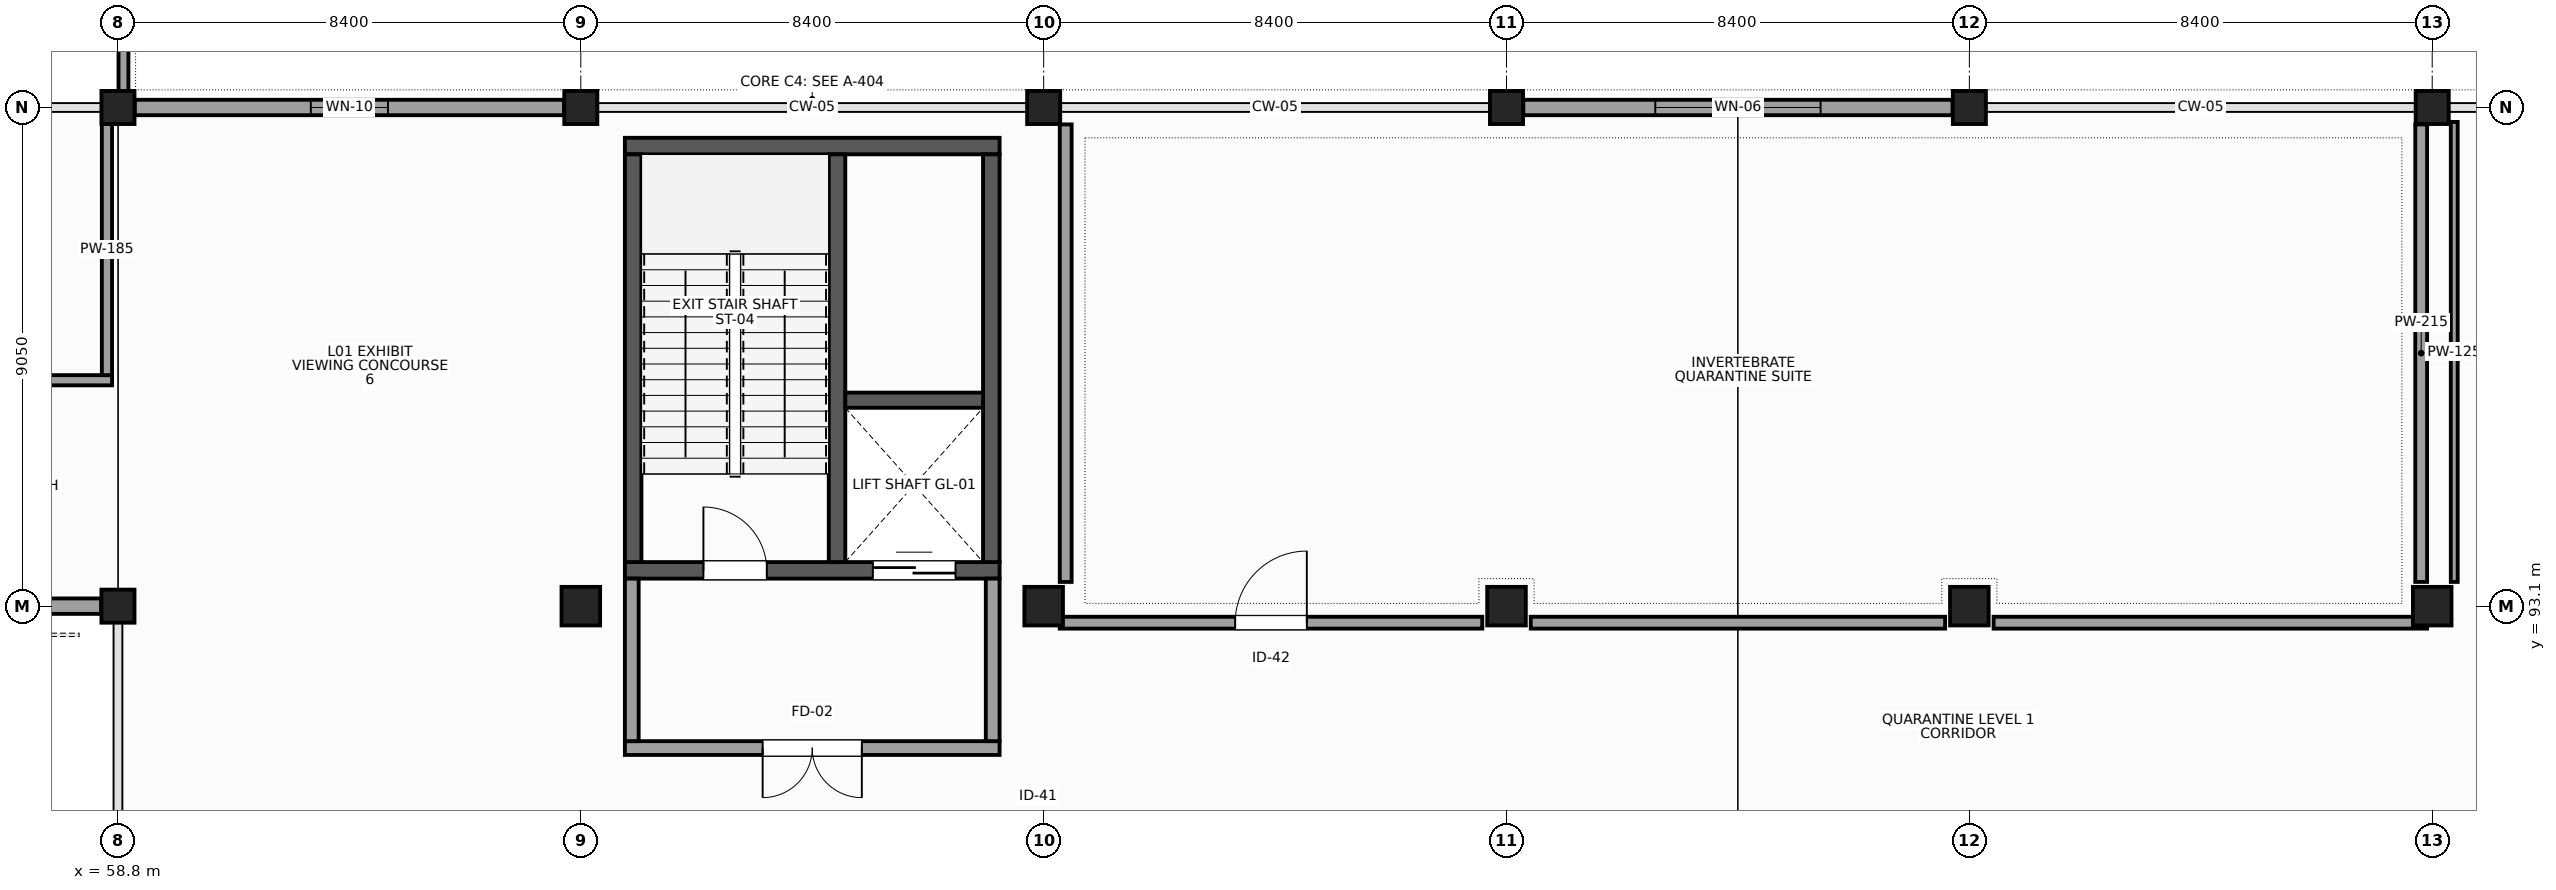
"""IFC4 building model, lengths in metres.
Left out: names, types, materials, properties, quantities, classifications, styles, units other than length and angle.
Written with IfcOpenShell. Run it as: python <this file> out.ifc"""

import sys

from ifc_helpers import new_model, si_unit, direction, frame, frame_2d, origin, origin_2d, place, context, subcontext, project, spatial, rectangle, extrude, element, fill, save


model = new_model("IFC4")
c1 = context("Model", 3, precision=1e-05, world=origin(), true_north=direction((0.0, 1.0)))
c2 = subcontext(c1, "Body", "Model", "MODEL_VIEW")
j1 = project(units=[si_unit("LENGTHUNIT", "METRE"), si_unit("PLANEANGLEUNIT", "RADIAN")], contexts=[c1])
p1 = place(None, origin())
s1 = spatial("IfcSite", under=j1, at=p1, CompositionType="ELEMENT")
p2 = place(p1, origin())
s2 = spatial("IfcBuilding", under=s1, at=p2, CompositionType="ELEMENT")
p3 = place(p2, frame((0.0, 0.0, 5.4)))
s3 = spatial("IfcBuildingStorey", under=s2, at=p3, CompositionType="ELEMENT", Elevation=5.4)
for number, where, z_axis, x_axis in (
    (1, (58.8, 93.1, 0.0), (0.0, 0.0, 1.0), (1.0, 0.0, 0.0)),
    (2, (58.8, 102.15, 0.0), (0.0, 0.0, 1.0), (1.0, 0.0, 0.0)),
):
    element("IfcColumn", number, at=place(p3, frame(where, z_axis=z_axis, x_axis=x_axis)), inside=s3, PredefinedType="COLUMN", context=c2, shape_type="SweptSolid", body=[
        extrude(rectangle(XDim=0.6, YDim=0.6, at=origin_2d()), origin(), (0.0, 0.0, 1.0), 5.4),
    ])
p4 = place(p3, frame((67.2, 93.1, 0.0), z_axis=(0.0, 0.0, 1.0), x_axis=(1.0, 0.0, 0.0)))
e3 = element("IfcColumn", 3, at=p4, inside=s3, PredefinedType="COLUMN", context=c2, shape_type="SweptSolid", body=[
    extrude(rectangle(XDim=0.7, YDim=0.7, at=origin_2d()), origin(), (0.0, 0.0, 1.0), 5.4),
])
p5 = place(p3, frame((67.2, 102.15, 0.0), z_axis=(0.0, 0.0, 1.0), x_axis=(1.0, 0.0, 0.0)))
e4 = element("IfcColumn", 4, at=p5, inside=s3, PredefinedType="COLUMN", context=c2, shape_type="SweptSolid", body=[
    extrude(rectangle(XDim=0.6, YDim=0.6, at=origin_2d()), origin(), (0.0, 0.0, 1.0), 5.4),
])
p6 = place(p3, frame((75.6, 93.1, 0.0), z_axis=(0.0, 0.0, 1.0), x_axis=(1.0, 0.0, 0.0)))
e5 = element("IfcColumn", 5, at=p6, inside=s3, PredefinedType="COLUMN", context=c2, shape_type="SweptSolid", body=[
    extrude(rectangle(XDim=0.7, YDim=0.7, at=origin_2d()), origin(), (0.0, 0.0, 1.0), 5.4),
])
p7 = place(p3, frame((75.6, 102.15, 0.0), z_axis=(0.0, 0.0, 1.0), x_axis=(1.0, 0.0, 0.0)))
e6 = element("IfcColumn", 6, at=p7, inside=s3, PredefinedType="COLUMN", context=c2, shape_type="SweptSolid", body=[
    extrude(rectangle(XDim=0.6, YDim=0.6, at=origin_2d()), origin(), (0.0, 0.0, 1.0), 5.4),
])
p8 = place(p3, frame((84.0, 93.1, 0.0), z_axis=(0.0, 0.0, 1.0), x_axis=(1.0, 0.0, 0.0)))
e7 = element("IfcColumn", 7, at=p8, inside=s3, PredefinedType="COLUMN", context=c2, shape_type="SweptSolid", body=[
    extrude(rectangle(XDim=0.7, YDim=0.7, at=origin_2d()), origin(), (0.0, 0.0, 1.0), 5.4),
])
p9 = place(p3, frame((84.0, 102.15, 0.0), z_axis=(0.0, 0.0, 1.0), x_axis=(1.0, 0.0, 0.0)))
e8 = element("IfcColumn", 8, at=p9, inside=s3, PredefinedType="COLUMN", context=c2, shape_type="SweptSolid", body=[
    extrude(rectangle(XDim=0.6, YDim=0.6, at=origin_2d()), origin(), (0.0, 0.0, 1.0), 5.4),
])
p10 = place(p3, frame((92.4, 93.1, 0.0), z_axis=(0.0, 0.0, 1.0), x_axis=(1.0, 0.0, 0.0)))
e9 = element("IfcColumn", 9, at=p10, inside=s3, PredefinedType="COLUMN", context=c2, shape_type="SweptSolid", body=[
    extrude(rectangle(XDim=0.7, YDim=0.7, at=origin_2d()), origin(), (0.0, 0.0, 1.0), 5.4),
])
p11 = place(p3, frame((92.4, 102.15, 0.0), z_axis=(0.0, 0.0, 1.0), x_axis=(1.0, 0.0, 0.0)))
e10 = element("IfcColumn", 10, at=p11, inside=s3, PredefinedType="COLUMN", context=c2, shape_type="SweptSolid", body=[
    extrude(rectangle(XDim=0.6, YDim=0.6, at=origin_2d()), origin(), (0.0, 0.0, 1.0), 5.4),
])
p12 = place(p3, frame((100.8, 93.1, 0.0), z_axis=(0.0, 0.0, 1.0), x_axis=(1.0, 0.0, 0.0)))
e11 = element("IfcColumn", 11, at=p12, inside=s3, PredefinedType="COLUMN", context=c2, shape_type="SweptSolid", body=[
    extrude(rectangle(XDim=0.7, YDim=0.7, at=origin_2d()), origin(), (0.0, 0.0, 1.0), 5.4),
])
p13 = place(p3, frame((100.8, 102.15, 0.0), z_axis=(0.0, 0.0, 1.0), x_axis=(1.0, 0.0, 0.0)))
e12 = element("IfcColumn", 12, at=p13, inside=s3, PredefinedType="COLUMN", context=c2, shape_type="SweptSolid", body=[
    extrude(rectangle(XDim=0.6, YDim=0.6, at=origin_2d()), origin(), (0.0, 0.0, 1.0), 5.4),
])
p14 = place(p3, frame((92.095, 102.15, 0.0), z_axis=(0.0, 0.0, 1.0), x_axis=(-1.0, 0.0, 0.0)))
e13 = element("IfcWall", 13, at=p14, inside=s3, PredefinedType="STANDARD", context=c2, shape_type="SweptSolid", body=[
    extrude(rectangle(XDim=7.79, YDim=0.28, at=frame_2d((3.895, 0.0))), origin(), (0.0, 0.0, 1.0), 4.23),
])
p15 = place(p14, frame((2.395, 0.0, 0.95)))
e14 = element("IfcOpeningElement", 14, at=p15, cuts=e13, PredefinedType="OPENING", context=c2, shape_type="SweptSolid", body=[
    extrude(rectangle(XDim=3.0, YDim=1.8, at=frame_2d((1.5, 0.9))), frame((0.0, 0.15, 0.0), z_axis=(0.0, -1.0, 0.0), x_axis=(1.0, 0.0, 0.0)), (0.0, 0.0, 1.0), 0.3),
])
p16 = place(p3, frame((66.895, 102.15, 0.0), z_axis=(0.0, 0.0, 1.0), x_axis=(-1.0, 0.0, 0.0)))
e15 = element("IfcWall", 15, at=p16, inside=s3, PredefinedType="STANDARD", context=c2, shape_type="SweptSolid", body=[
    extrude(rectangle(XDim=7.79, YDim=0.28, at=frame_2d((3.895, 0.0))), origin(), (0.0, 0.0, 1.0), 4.23),
])
p17 = place(p16, frame((3.195, 0.0, 0.95)))
e16 = element("IfcOpeningElement", 16, at=p17, cuts=e15, PredefinedType="OPENING", context=c2, shape_type="SweptSolid", body=[
    extrude(rectangle(XDim=1.4, YDim=1.6, at=frame_2d((0.7, 0.8))), frame((0.0, 0.15, 0.0), z_axis=(0.0, -1.0, 0.0), x_axis=(1.0, 0.0, 0.0)), (0.0, 0.0, 1.0), 0.3),
])
p18 = place(p3, frame((50.705, 93.1, 0.0), z_axis=(0.0, 0.0, 1.0), x_axis=(1.0, 0.0, 0.0)))
e17 = element("IfcWall", 17, at=p18, inside=s3, PredefinedType="STANDARD", context=c2, shape_type="SweptSolid", body=[
    extrude(rectangle(XDim=7.79, YDim=0.28, at=frame_2d((3.895, 0.0))), origin(), (0.0, 0.0, 1.0), 4.23),
])
p19 = place(p18, frame((2.495, 0.0, 0.95)))
e18 = element("IfcOpeningElement", 18, at=p19, cuts=e17, PredefinedType="OPENING", context=c2, shape_type="SweptSolid", body=[
    extrude(rectangle(XDim=2.8, YDim=2.2, at=frame_2d((1.4, 1.1))), frame((0.0, 0.15, 0.0), z_axis=(0.0, -1.0, 0.0), x_axis=(1.0, 0.0, 0.0)), (0.0, 0.0, 1.0), 0.3),
])
p20 = place(p3, frame((58.9, 102.35, 0.0), z_axis=(0.0, 0.0, 1.0), x_axis=(0.0, 1.0, 0.0)))
e19 = element("IfcWall", 19, at=p20, inside=s3, PredefinedType="PARAPET", context=c2, shape_type="SweptSolid", body=[
    extrude(rectangle(XDim=8.65, YDim=0.18, at=frame_2d((4.325, 0.0))), origin(), (0.0, 0.0, 1.0), 1.12),
])
p21 = place(p3, frame((68.0, 93.75, 0.0), z_axis=(0.0, 0.0, 1.0), x_axis=(1.0, 0.0, 0.0)))
e20 = element("IfcWall", 20, at=p21, inside=s3, PredefinedType="SHEAR", context=c2, shape_type="SweptSolid", body=[
    extrude(rectangle(XDim=6.8, YDim=0.3, at=frame_2d((3.4, 0.0))), origin(), (0.0, 0.0, 1.0), 5.1),
])
p22 = place(p21, frame((1.425, 0.0, 0.0)))
e21 = element("IfcOpeningElement", 21, at=p22, cuts=e20, PredefinedType="OPENING", context=c2, shape_type="SweptSolid", body=[
    extrude(rectangle(XDim=1.15, YDim=2.2, at=frame_2d((0.575, 1.1))), frame((0.0, 0.16, 0.0), z_axis=(0.0, -1.0, 0.0), x_axis=(1.0, 0.0, 0.0)), (0.0, 0.0, 1.0), 0.32),
])
p23 = place(p21, frame((4.5, 0.0, 0.0)))
e22 = element("IfcOpeningElement", 22, at=p23, cuts=e20, PredefinedType="OPENING", context=c2, shape_type="SweptSolid", body=[
    extrude(rectangle(XDim=1.5, YDim=2.3, at=frame_2d((0.75, 1.15))), frame((0.0, 0.16, 0.0), z_axis=(0.0, -1.0, 0.0), x_axis=(1.0, 0.0, 0.0)), (0.0, 0.0, 1.0), 0.32),
])
p24 = place(p3, frame((68.0, 101.45, 0.0), z_axis=(0.0, 0.0, 1.0), x_axis=(1.0, 0.0, 0.0)))
e23 = element("IfcWall", 23, at=p24, inside=s3, PredefinedType="SHEAR", context=c2, shape_type="SweptSolid", body=[
    extrude(rectangle(XDim=6.8, YDim=0.3, at=frame_2d((3.4, 0.0))), origin(), (0.0, 0.0, 1.0), 5.1),
])
for number, where, z_axis, x_axis in (
    (24, (68.15, 93.9, 0.0), (0.0, 0.0, 1.0), (0.0, 1.0, 0.0)),
    (25, (74.65, 93.9, 0.0), (0.0, 0.0, 1.0), (0.0, 1.0, 0.0)),
    (26, (71.85, 93.9, 0.0), (0.0, 0.0, 1.0), (0.0, 1.0, 0.0)),
):
    element("IfcWall", number, at=place(p3, frame(where, z_axis=z_axis, x_axis=x_axis)), inside=s3, PredefinedType="SHEAR", context=c2, shape_type="SweptSolid", body=[
        extrude(rectangle(XDim=7.4, YDim=0.3, at=frame_2d((3.7, 0.0))), origin(), (0.0, 0.0, 1.0), 5.1),
    ])
p25 = place(p3, frame((72.0, 96.838, 0.0), z_axis=(0.0, 0.0, 1.0), x_axis=(1.0, 0.0, 0.0)))
e27 = element("IfcWall", 27, at=p25, inside=s3, PredefinedType="SHEAR", context=c2, shape_type="SweptSolid", body=[
    extrude(rectangle(XDim=2.5, YDim=0.275, at=frame_2d((1.25, 0.0))), origin(), (0.0, 0.0, 1.0), 5.1),
])
p26 = place(p3, frame((68.0, 90.525, 0.0), z_axis=(0.0, 0.0, 1.0), x_axis=(1.0, 0.0, 0.0)))
e28 = element("IfcWall", 28, at=p26, inside=s3, PredefinedType="PARTITIONING", context=c2, shape_type="SweptSolid", body=[
    extrude(rectangle(XDim=6.8, YDim=0.25, at=frame_2d((3.4, 0.0))), origin(), (0.0, 0.0, 1.0), 5.1),
])
p27 = place(p26, frame((2.5, 0.0, 0.0)))
e29 = element("IfcOpeningElement", 29, at=p27, cuts=e28, PredefinedType="OPENING", context=c2, shape_type="SweptSolid", body=[
    extrude(rectangle(XDim=1.8, YDim=2.25, at=frame_2d((0.9, 1.125))), frame((0.0, 0.135, 0.0), z_axis=(0.0, -1.0, 0.0), x_axis=(1.0, 0.0, 0.0)), (0.0, 0.0, 1.0), 0.27),
])
for number, where, z_axis, x_axis in (
    (30, (68.125, 90.65, 0.0), (0.0, 0.0, 1.0), (0.0, 1.0, 0.0)),
    (31, (74.675, 90.65, 0.0), (0.0, 0.0, 1.0), (0.0, 1.0, 0.0)),
):
    element("IfcWall", number, at=place(p3, frame(where, z_axis=z_axis, x_axis=x_axis)), inside=s3, PredefinedType="PARTITIONING", context=c2, shape_type="SweptSolid", body=[
        extrude(rectangle(XDim=2.95, YDim=0.25, at=frame_2d((1.475, 0.0))), origin(), (0.0, 0.0, 1.0), 4.33),
    ])
p28 = place(p3, frame((33.707, 97.2, 0.0), z_axis=(0.0, 0.0, 1.0), x_axis=(1.0, 0.0, 0.0)))
e32 = element("IfcWall", 32, at=p28, inside=s3, PredefinedType="PARTITIONING", context=c2, shape_type="SweptSolid", body=[
    extrude(rectangle(XDim=24.986, YDim=0.185, at=frame_2d((12.493, 0.0))), origin(), (0.0, 0.0, 1.0), 4.25),
])
p29 = place(p28, frame((11.923, 0.0, 0.0)))
e33 = element("IfcOpeningElement", 33, at=p29, cuts=e32, PredefinedType="OPENING", context=c2, shape_type="SweptSolid", body=[
    extrude(rectangle(XDim=1.14, YDim=2.28, at=frame_2d((0.57, 1.14))), frame((0.0, 0.103, 0.0), z_axis=(0.0, -1.0, 0.0), x_axis=(1.0, 0.0, 0.0)), (0.0, 0.0, 1.0), 0.205),
])
p30 = place(p28, frame((13.663, 0.0, 1.05)))
e34 = element("IfcOpeningElement", 34, at=p30, cuts=e32, PredefinedType="OPENING", context=c2, shape_type="SweptSolid", body=[
    extrude(rectangle(XDim=1.55, YDim=1.32, at=frame_2d((0.775, 0.66))), frame((0.0, 0.103, 0.0), z_axis=(0.0, -1.0, 0.0), x_axis=(1.0, 0.0, 0.0)), (0.0, 0.0, 1.0), 0.205),
])
p31 = place(p3, frame((58.6, 97.293, 0.0), z_axis=(0.0, 0.0, 1.0), x_axis=(0.0, 1.0, 0.0)))
e35 = element("IfcWall", 35, at=p31, inside=s3, PredefinedType="PARTITIONING", context=c2, shape_type="SweptSolid", body=[
    extrude(rectangle(XDim=4.565, YDim=0.185, at=frame_2d((2.282, 0.0))), origin(), (0.0, 0.0, 1.0), 4.23),
])
p32 = place(p3, frame((75.892, 92.8, 0.0), z_axis=(0.0, 0.0, 1.0), x_axis=(1.0, 0.0, 0.0)))
e36 = element("IfcWall", 36, at=p32, inside=s3, PredefinedType="PARTITIONING", context=c2, shape_type="SweptSolid", body=[
    extrude(rectangle(XDim=7.668, YDim=0.215, at=frame_2d((3.834, 0.0))), origin(), (0.0, 0.0, 1.0), 4.33),
])
p33 = place(p32, frame((3.184, 0.0, 0.0)))
e37 = element("IfcOpeningElement", 37, at=p33, cuts=e36, PredefinedType="OPENING", context=c2, shape_type="SweptSolid", body=[
    extrude(rectangle(XDim=1.3, YDim=2.38, at=frame_2d((0.65, 1.19))), frame((0.0, 0.118, 0.0), z_axis=(0.0, -1.0, 0.0), x_axis=(1.0, 0.0, 0.0)), (0.0, 0.0, 1.0), 0.235),
])
p34 = place(p3, frame((84.44, 92.8, 0.0), z_axis=(0.0, 0.0, 1.0), x_axis=(1.0, 0.0, 0.0)))
e38 = element("IfcWall", 38, at=p34, inside=s3, PredefinedType="PARTITIONING", context=c2, shape_type="SweptSolid", body=[
    extrude(rectangle(XDim=7.52, YDim=0.215, at=frame_2d((3.76, 0.0))), origin(), (0.0, 0.0, 1.0), 4.33),
])
p35 = place(p3, frame((92.84, 92.8, 0.0), z_axis=(0.0, 0.0, 1.0), x_axis=(1.0, 0.0, 0.0)))
e39 = element("IfcWall", 39, at=p35, inside=s3, PredefinedType="PARTITIONING", context=c2, shape_type="SweptSolid", body=[
    extrude(rectangle(XDim=7.867, YDim=0.215, at=frame_2d((3.934, 0.0))), origin(), (0.0, 0.0, 1.0), 4.33),
])
for number, where, z_axis, x_axis in (
    (40, (100.6, 93.54, 0.0), (0.0, 0.0, 1.0), (0.0, 1.0, 0.0)),
    (41, (76.0, 93.54, 0.0), (0.0, 0.0, 1.0), (0.0, 1.0, 0.0)),
):
    element("IfcWall", number, at=place(p3, frame(where, z_axis=z_axis, x_axis=x_axis)), inside=s3, PredefinedType="PARTITIONING", context=c2, shape_type="SweptSolid", body=[
        extrude(rectangle(XDim=8.303, YDim=0.215, at=frame_2d((4.151, 0.0))), origin(), (0.0, 0.0, 1.0), 4.23),
    ])
p36 = place(p3, frame((101.2, 93.54, 0.0), z_axis=(0.0, 0.0, 1.0), x_axis=(0.0, 1.0, 0.0)))
e42 = element("IfcWall", 42, at=p36, inside=s3, PredefinedType="PARTITIONING", context=c2, shape_type="SweptSolid", body=[
    extrude(rectangle(XDim=8.348, YDim=0.125, at=frame_2d((4.174, 0.0))), origin(), (0.0, 0.0, 1.0), 4.23),
])
p37 = place(p15, origin())
e43 = element("IfcWindow", 43, at=p37, inside=s3, PartitioningType="SINGLE_PANEL", PredefinedType="WINDOW", context=c2, shape_type="SweptSolid", body=[
    extrude(rectangle(XDim=3.0, YDim=1.8, at=frame_2d((1.5, 0.9))), frame((0.0, 0.03, 0.0), z_axis=(0.0, -1.0, 0.0), x_axis=(1.0, 0.0, 0.0)), (0.0, 0.0, 1.0), 0.06),
])
fill(e14, e43)
p38 = place(p17, origin())
e44 = element("IfcWindow", 44, at=p38, inside=s3, PartitioningType="SINGLE_PANEL", PredefinedType="WINDOW", context=c2, shape_type="SweptSolid", body=[
    extrude(rectangle(XDim=1.4, YDim=1.6, at=frame_2d((0.7, 0.8))), frame((0.0, 0.03, 0.0), z_axis=(0.0, -1.0, 0.0), x_axis=(1.0, 0.0, 0.0)), (0.0, 0.0, 1.0), 0.06),
])
fill(e16, e44)
p39 = place(p22, origin())
e45 = element("IfcDoor", 45, at=p39, inside=s3, OperationType="SINGLE_SWING_LEFT", PredefinedType="DOOR", context=c2, shape_type="SweptSolid", body=[
    extrude(rectangle(XDim=1.15, YDim=2.2, at=frame_2d((0.575, 1.1))), frame((0.0, 0.025, 0.0), z_axis=(0.0, -1.0, 0.0), x_axis=(1.0, 0.0, 0.0)), (0.0, 0.0, 1.0), 0.05),
])
fill(e21, e45)
p40 = place(p23, origin())
e46 = element("IfcDoor", 46, at=p40, inside=s3, OperationType="DOUBLE_DOOR_SLIDING", PredefinedType="DOOR", context=c2, shape_type="SweptSolid", body=[
    extrude(rectangle(XDim=1.5, YDim=2.3, at=frame_2d((0.75, 1.15))), frame((0.0, 0.025, 0.0), z_axis=(0.0, -1.0, 0.0), x_axis=(1.0, 0.0, 0.0)), (0.0, 0.0, 1.0), 0.05),
])
fill(e22, e46)
p41 = place(p27, frame((1.8, 0.0, 0.0), z_axis=(0.0, 0.0, 1.0), x_axis=(-1.0, 0.0, 0.0)))
e47 = element("IfcDoor", 47, at=p41, inside=s3, OperationType="DOUBLE_DOOR_SINGLE_SWING", PredefinedType="DOOR", context=c2, shape_type="SweptSolid", body=[
    extrude(rectangle(XDim=1.8, YDim=2.25, at=frame_2d((0.9, 1.125))), frame((0.0, 0.025, 0.0), z_axis=(0.0, -1.0, 0.0), x_axis=(1.0, 0.0, 0.0)), (0.0, 0.0, 1.0), 0.05),
])
fill(e29, e47)
p42 = place(p33, origin())
e48 = element("IfcDoor", 48, at=p42, inside=s3, OperationType="SINGLE_SWING_RIGHT", PredefinedType="DOOR", context=c2, shape_type="SweptSolid", body=[
    extrude(rectangle(XDim=1.3, YDim=2.38, at=frame_2d((0.65, 1.19))), frame((0.0, 0.025, 0.0), z_axis=(0.0, -1.0, 0.0), x_axis=(1.0, 0.0, 0.0)), (0.0, 0.0, 1.0), 0.05),
])
fill(e37, e48)
save(model, sys.argv[1])
